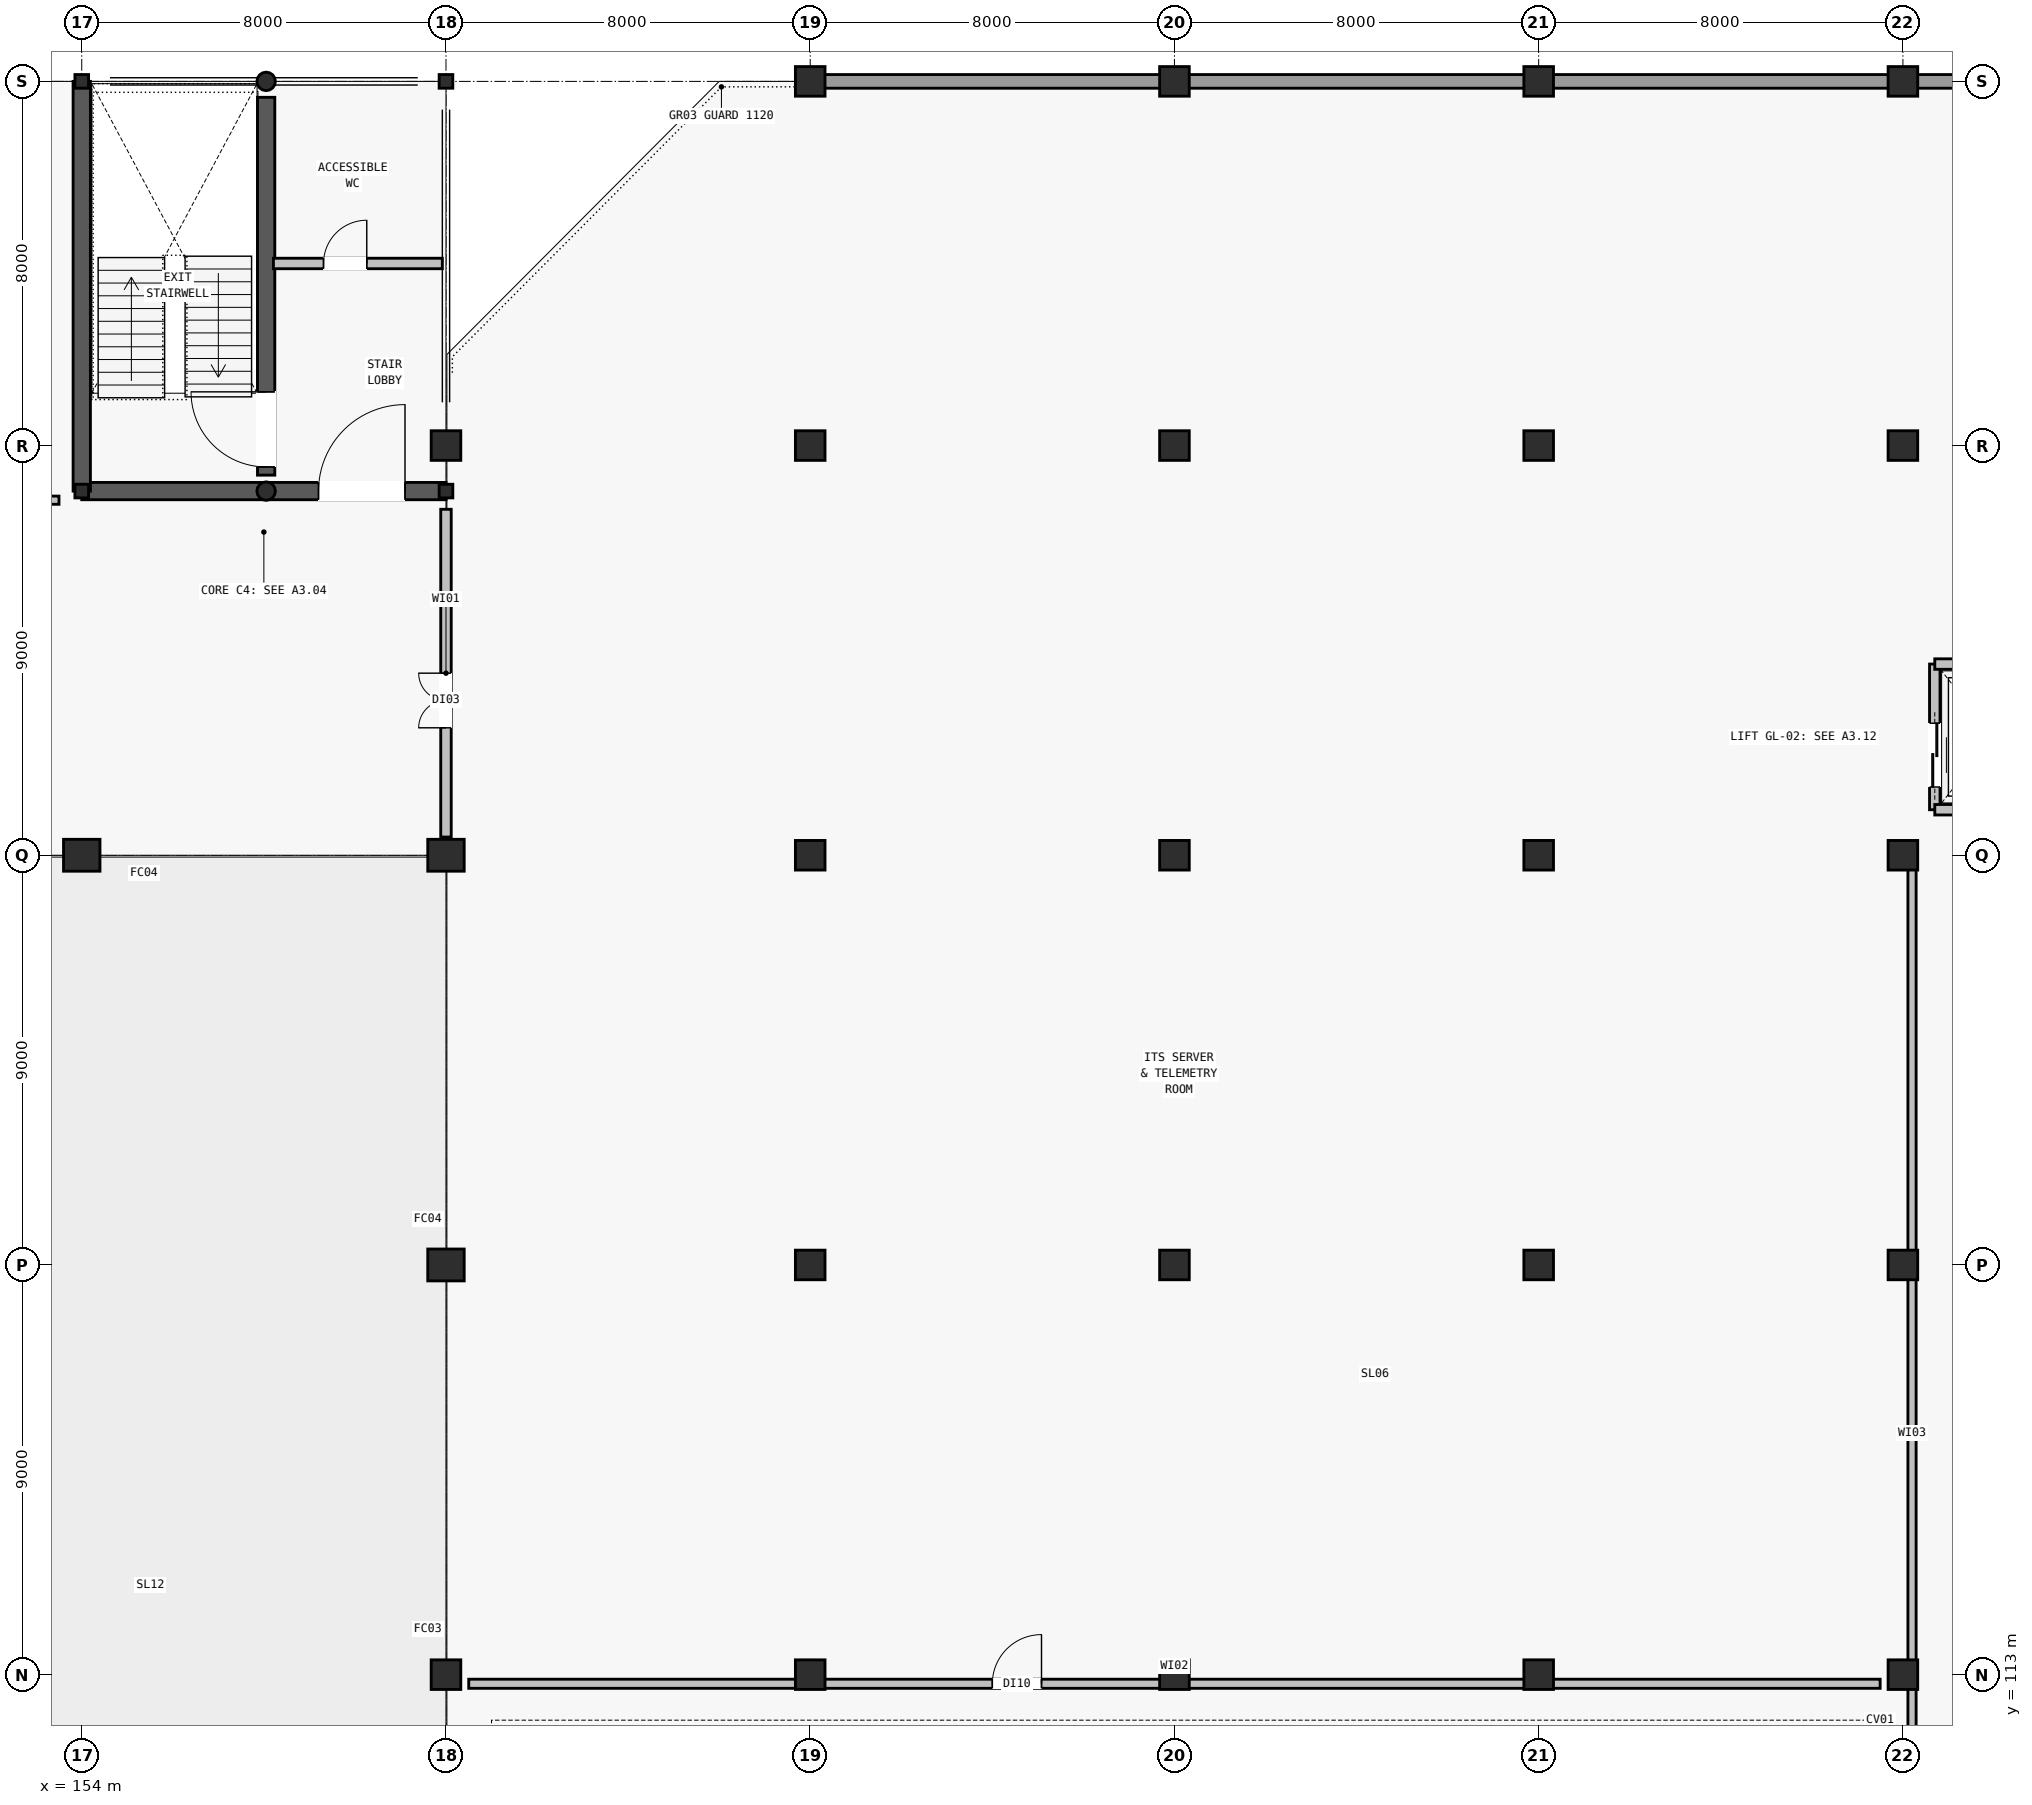
"""IFC4 building model, lengths in metres.
Left out: names, types, materials, properties, quantities, classifications, styles, units other than length and angle.
Written with IfcOpenShell. Run it as: python <this file> out.ifc"""

import sys

from ifc_helpers import new_model, si_unit, direction, frame, frame_2d, origin, origin_2d, place, context, subcontext, project, spatial, rectangle, hollow_circle, i_section, extrude, element, fill, save


model = new_model("IFC4")
c1 = context("Model", 3, precision=1e-05, world=origin(), true_north=direction((0.0, 1.0)))
c2 = subcontext(c1, "Body", "Model", "MODEL_VIEW")
j1 = project(units=[si_unit("LENGTHUNIT", "METRE"), si_unit("PLANEANGLEUNIT", "RADIAN")], contexts=[c1])
p1 = place(None, origin())
s1 = spatial("IfcSite", under=j1, at=p1, CompositionType="ELEMENT")
p2 = place(p1, origin())
s2 = spatial("IfcBuilding", under=s1, at=p2, CompositionType="ELEMENT")
p3 = place(p2, frame((0.0, 0.0, 9.5)))
s3 = spatial("IfcBuildingStorey", under=s2, at=p3, CompositionType="ELEMENT", Elevation=9.5)
for number, where, z_axis, x_axis in (
    (1, (154.0, 148.0, 0.0), (0.0, 0.0, 1.0), (1.0, 0.0, 0.0)),
    (2, (162.0, 148.0, 0.0), (0.0, 0.0, 1.0), (1.0, 0.0, 0.0)),
    (3, (154.0, 139.0, 0.0), (0.0, 0.0, 1.0), (1.0, 0.0, 0.0)),
    (4, (162.0, 139.0, 0.0), (0.0, 0.0, 1.0), (1.0, 0.0, 0.0)),
):
    element("IfcColumn", number, at=place(p3, frame(where, z_axis=z_axis, x_axis=x_axis)), inside=s3, PredefinedType="COLUMN", context=c2, shape_type="SweptSolid", body=[
        extrude(i_section(OverallWidth=0.3, OverallDepth=0.3, WebThickness=0.01, FlangeThickness=0.015, FilletRadius=0.018, at=origin_2d()), origin(), (0.0, 0.0, 1.0), 3.9),
    ])
for number, where, z_axis, x_axis in (
    (5, (158.05, 139.0, 0.0), (0.0, 0.0, 1.0), (1.0, 0.0, 0.0)),
    (6, (158.05, 148.0, 0.0), (0.0, 0.0, 1.0), (1.0, 0.0, 0.0)),
):
    element("IfcColumn", number, at=place(p3, frame(where, z_axis=z_axis, x_axis=x_axis)), inside=s3, PredefinedType="COLUMN", context=c2, shape_type="SweptSolid", body=[
        extrude(hollow_circle(Radius=0.203, WallThickness=0.014, at=origin_2d()), origin(), (0.0, 0.0, 1.0), 3.9),
    ])
for number, where, z_axis, x_axis in (
    (7, (154.0, 131.0, 0.0), (0.0, 0.0, 1.0), (1.0, 0.0, 0.0)),
    (8, (162.0, 122.0, 0.0), (0.0, 0.0, 1.0), (1.0, 0.0, 0.0)),
    (9, (162.0, 131.0, 0.0), (0.0, 0.0, 1.0), (1.0, 0.0, 0.0)),
):
    element("IfcColumn", number, at=place(p3, frame(where, z_axis=z_axis, x_axis=x_axis)), inside=s3, PredefinedType="COLUMN", context=c2, shape_type="SweptSolid", body=[
        extrude(rectangle(XDim=0.8, YDim=0.7, at=origin_2d()), origin(), (0.0, 0.0, 1.0), 3.9),
    ])
for number, where, z_axis, x_axis in (
    (10, (162.0, 113.0, 0.0), (0.0, 0.0, 1.0), (1.0, 0.0, 0.0)),
    (11, (162.0, 140.0, 0.0), (0.0, 0.0, 1.0), (1.0, 0.0, 0.0)),
    (12, (170.0, 113.0, 0.0), (0.0, 0.0, 1.0), (1.0, 0.0, 0.0)),
    (13, (170.0, 122.0, 0.0), (0.0, 0.0, 1.0), (1.0, 0.0, 0.0)),
    (14, (170.0, 131.0, 0.0), (0.0, 0.0, 1.0), (1.0, 0.0, 0.0)),
    (15, (170.0, 140.0, 0.0), (0.0, 0.0, 1.0), (1.0, 0.0, 0.0)),
    (16, (170.0, 148.0, 0.0), (0.0, 0.0, 1.0), (1.0, 0.0, 0.0)),
    (17, (178.0, 113.0, 0.0), (0.0, 0.0, 1.0), (1.0, 0.0, 0.0)),
    (18, (178.0, 122.0, 0.0), (0.0, 0.0, 1.0), (1.0, 0.0, 0.0)),
    (19, (178.0, 131.0, 0.0), (0.0, 0.0, 1.0), (1.0, 0.0, 0.0)),
    (20, (178.0, 140.0, 0.0), (0.0, 0.0, 1.0), (1.0, 0.0, 0.0)),
    (21, (178.0, 148.0, 0.0), (0.0, 0.0, 1.0), (1.0, 0.0, 0.0)),
    (22, (186.0, 113.0, 0.0), (0.0, 0.0, 1.0), (1.0, 0.0, 0.0)),
    (23, (186.0, 122.0, 0.0), (0.0, 0.0, 1.0), (1.0, 0.0, 0.0)),
    (24, (186.0, 131.0, 0.0), (0.0, 0.0, 1.0), (1.0, 0.0, 0.0)),
    (25, (186.0, 140.0, 0.0), (0.0, 0.0, 1.0), (1.0, 0.0, 0.0)),
    (26, (186.0, 148.0, 0.0), (0.0, 0.0, 1.0), (1.0, 0.0, 0.0)),
    (27, (194.0, 113.0, 0.0), (0.0, 0.0, 1.0), (1.0, 0.0, 0.0)),
    (28, (194.0, 122.0, 0.0), (0.0, 0.0, 1.0), (1.0, 0.0, 0.0)),
    (29, (194.0, 131.0, 0.0), (0.0, 0.0, 1.0), (1.0, 0.0, 0.0)),
    (30, (194.0, 140.0, 0.0), (0.0, 0.0, 1.0), (1.0, 0.0, 0.0)),
    (31, (194.0, 148.0, 0.0), (0.0, 0.0, 1.0), (1.0, 0.0, 0.0)),
):
    element("IfcColumn", number, at=place(p3, frame(where, z_axis=z_axis, x_axis=x_axis)), inside=s3, PredefinedType="COLUMN", context=c2, shape_type="SweptSolid", body=[
        extrude(rectangle(XDim=0.65, YDim=0.65, at=origin_2d()), origin(), (0.0, 0.0, 1.0), 3.9),
    ])
for number, where, z_axis, x_axis in (
    (32, (177.695, 148.0, 0.0), (0.0, 0.0, 1.0), (-1.0, 0.0, 0.0)),
    (33, (185.695, 148.0, 0.0), (0.0, 0.0, 1.0), (-1.0, 0.0, 0.0)),
    (34, (193.695, 148.0, 0.0), (0.0, 0.0, 1.0), (-1.0, 0.0, 0.0)),
):
    element("IfcWall", number, at=place(p3, frame(where, z_axis=z_axis, x_axis=x_axis)), inside=s3, PredefinedType="STANDARD", context=c2, shape_type="SweptSolid", body=[
        extrude(rectangle(XDim=7.39, YDim=0.3, at=frame_2d((3.695, 0.0))), origin(), (0.0, 0.0, 1.0), 2.48),
    ])
p4 = place(p3, frame((201.695, 148.0, 0.0), z_axis=(0.0, 0.0, 1.0), x_axis=(-1.0, 0.0, 0.0)))
e35 = element("IfcWall", 35, at=p4, inside=s3, PredefinedType="STANDARD", context=c2, shape_type="SweptSolid", body=[
    extrude(rectangle(XDim=7.39, YDim=0.3, at=frame_2d((3.695, 0.0))), origin(), (0.0, 0.0, 1.0), 2.48),
])
p5 = place(p4, frame((2.175, 0.0, 0.95)))
e36 = element("IfcOpeningElement", 36, at=p5, cuts=e35, PredefinedType="OPENING", context=c2, shape_type="SweptSolid", body=[
    extrude(rectangle(XDim=1.05, YDim=1.25, at=frame_2d((0.525, 0.625))), frame((0.0, 0.16, 0.0), z_axis=(0.0, -1.0, 0.0), x_axis=(1.0, 0.0, 0.0)), (0.0, 0.0, 1.0), 0.32),
])
p6 = place(p3, frame((154.0, 139.0, 0.0), z_axis=(0.0, 0.0, 1.0), x_axis=(1.0, 0.0, 0.0)))
e37 = element("IfcWall", 37, at=p6, inside=s3, PredefinedType="SHEAR", context=c2, shape_type="SweptSolid", body=[
    extrude(rectangle(XDim=8.0, YDim=0.38, at=frame_2d((4.0, 0.0))), origin(), (0.0, 0.0, 1.0), 3.62),
])
p7 = place(p6, frame((5.2, 0.0, 0.0)))
e38 = element("IfcOpeningElement", 38, at=p7, cuts=e37, PredefinedType="OPENING", context=c2, shape_type="SweptSolid", body=[
    extrude(rectangle(XDim=1.9, YDim=2.3, at=frame_2d((0.95, 1.15))), frame((0.0, 0.2, 0.0), z_axis=(0.0, -1.0, 0.0), x_axis=(1.0, 0.0, 0.0)), (0.0, 0.0, 1.0), 0.4),
])
p8 = place(p3, frame((154.0, 148.0, 0.0), z_axis=(0.0, 0.0, 1.0), x_axis=(0.0, -1.0, 0.0)))
e39 = element("IfcWall", 39, at=p8, inside=s3, PredefinedType="SHEAR", context=c2, shape_type="SweptSolid", body=[
    extrude(rectangle(XDim=9.0, YDim=0.38, at=frame_2d((4.5, 0.0))), origin(), (0.0, 0.0, 1.0), 3.62),
])
p9 = place(p3, frame((158.05, 139.35, 0.0), z_axis=(0.0, 0.0, 1.0), x_axis=(0.0, 1.0, 0.0)))
e40 = element("IfcWall", 40, at=p9, inside=s3, PredefinedType="SHEAR", context=c2, shape_type="SweptSolid", body=[
    extrude(rectangle(XDim=8.3, YDim=0.38, at=frame_2d((4.15, 0.0))), origin(), (0.0, 0.0, 1.0), 3.62),
])
p10 = place(p9, frame((0.18, 0.0, 0.0)))
e41 = element("IfcOpeningElement", 41, at=p10, cuts=e40, PredefinedType="OPENING", context=c2, shape_type="SweptSolid", body=[
    extrude(rectangle(XDim=1.65, YDim=2.2, at=frame_2d((0.825, 1.1))), frame((0.0, 0.2, 0.0), z_axis=(0.0, -1.0, 0.0), x_axis=(1.0, 0.0, 0.0)), (0.0, 0.0, 1.0), 0.4),
])
p11 = place(p3, frame((158.21, 144.0, 0.0), z_axis=(0.0, 0.0, 1.0), x_axis=(1.0, 0.0, 0.0)))
e42 = element("IfcWall", 42, at=p11, inside=s3, PredefinedType="PARTITIONING", context=c2, shape_type="SweptSolid", body=[
    extrude(rectangle(XDim=3.71, YDim=0.23, at=frame_2d((1.855, 0.0))), origin(), (0.0, 0.0, 1.0), 2.48),
])
p12 = place(p11, frame((1.1, 0.0, 0.0)))
e43 = element("IfcOpeningElement", 43, at=p12, cuts=e42, PredefinedType="OPENING", context=c2, shape_type="SweptSolid", body=[
    extrude(rectangle(XDim=0.95, YDim=2.1, at=frame_2d((0.475, 1.05))), frame((0.0, 0.125, 0.0), z_axis=(0.0, -1.0, 0.0), x_axis=(1.0, 0.0, 0.0)), (0.0, 0.0, 1.0), 0.25),
])
p13 = place(p3, frame((194.7, 132.0, 0.0), z_axis=(0.0, 0.0, 1.0), x_axis=(0.0, 1.0, 0.0)))
e44 = element("IfcWall", 44, at=p13, inside=s3, PredefinedType="PARTITIONING", context=c2, shape_type="SweptSolid", body=[
    extrude(rectangle(XDim=3.2, YDim=0.23, at=frame_2d((1.6, 0.0))), origin(), (0.0, 0.0, 1.0), 2.48),
])
p14 = place(p13, frame((0.5, 0.0, 0.0)))
e45 = element("IfcOpeningElement", 45, at=p14, cuts=e44, PredefinedType="OPENING", context=c2, shape_type="SweptSolid", body=[
    extrude(rectangle(XDim=1.4, YDim=2.3, at=frame_2d((0.7, 1.15))), frame((0.0, 0.125, 0.0), z_axis=(0.0, -1.0, 0.0), x_axis=(1.0, 0.0, 0.0)), (0.0, 0.0, 1.0), 0.25),
])
for number, where, z_axis, x_axis in (
    (46, (194.7, 135.2, 0.0), (0.0, 0.0, 1.0), (1.0, 0.0, 0.0)),
    (47, (197.3, 132.0, 0.0), (0.0, 0.0, 1.0), (-1.0, 0.0, 0.0)),
):
    element("IfcWall", number, at=place(p3, frame(where, z_axis=z_axis, x_axis=x_axis)), inside=s3, PredefinedType="PARTITIONING", context=c2, shape_type="SweptSolid", body=[
        extrude(rectangle(XDim=2.6, YDim=0.23, at=frame_2d((1.3, 0.0))), origin(), (0.0, 0.0, 1.0), 2.48),
    ])
p15 = place(p3, frame((162.0, 131.4, 0.0), z_axis=(0.0, 0.0, 1.0), x_axis=(0.0, 1.0, 0.0)))
e48 = element("IfcWall", 48, at=p15, inside=s3, PredefinedType="PARTITIONING", context=c2, shape_type="SweptSolid", body=[
    extrude(rectangle(XDim=7.2, YDim=0.23, at=frame_2d((3.6, 0.0))), origin(), (0.0, 0.0, 1.0), 2.48),
])
p16 = place(p15, frame((2.4, 0.0, 0.0)))
e49 = element("IfcOpeningElement", 49, at=p16, cuts=e48, PredefinedType="OPENING", context=c2, shape_type="SweptSolid", body=[
    extrude(rectangle(XDim=1.2, YDim=2.2, at=frame_2d((0.6, 1.1))), frame((0.0, 0.125, 0.0), z_axis=(0.0, -1.0, 0.0), x_axis=(1.0, 0.0, 0.0)), (0.0, 0.0, 1.0), 0.25),
])
p17 = place(p3, frame((96.5, 138.8, 0.0), z_axis=(0.0, 0.0, 1.0), x_axis=(1.0, 0.0, 0.0)))
e50 = element("IfcWall", 50, at=p17, inside=s3, PredefinedType="PARTITIONING", context=c2, shape_type="SweptSolid", body=[
    extrude(rectangle(XDim=57.0, YDim=0.18, at=frame_2d((28.5, 0.0))), origin(), (0.0, 0.0, 1.0), 2.48),
])
p18 = place(p17, frame((16.5, 0.0, 0.0)))
e51 = element("IfcOpeningElement", 51, at=p18, cuts=e50, PredefinedType="OPENING", context=c2, shape_type="SweptSolid", body=[
    extrude(rectangle(XDim=1.75, YDim=2.25, at=frame_2d((0.875, 1.125))), frame((0.0, 0.1, 0.0), z_axis=(0.0, -1.0, 0.0), x_axis=(1.0, 0.0, 0.0)), (0.0, 0.0, 1.0), 0.2),
])
p19 = place(p3, frame((162.5, 112.8, 0.0), z_axis=(0.0, 0.0, 1.0), x_axis=(1.0, 0.0, 0.0)))
e52 = element("IfcWall", 52, at=p19, inside=s3, PredefinedType="PARTITIONING", context=c2, shape_type="SweptSolid", body=[
    extrude(rectangle(XDim=31.0, YDim=0.2, at=frame_2d((15.5, 0.0))), origin(), (0.0, 0.0, 1.0), 2.48),
])
p20 = place(p19, frame((11.5, 0.0, 0.0)))
e53 = element("IfcOpeningElement", 53, at=p20, cuts=e52, PredefinedType="OPENING", context=c2, shape_type="SweptSolid", body=[
    extrude(rectangle(XDim=1.08, YDim=2.15, at=frame_2d((0.54, 1.075))), frame((0.0, 0.11, 0.0), z_axis=(0.0, -1.0, 0.0), x_axis=(1.0, 0.0, 0.0)), (0.0, 0.0, 1.0), 0.22),
])
p21 = place(p3, frame((194.2, 86.2, 0.0), z_axis=(0.0, 0.0, 1.0), x_axis=(0.0, 1.0, 0.0)))
e54 = element("IfcWall", 54, at=p21, inside=s3, PredefinedType="PARTITIONING", context=c2, shape_type="SweptSolid", body=[
    extrude(rectangle(XDim=45.0, YDim=0.18, at=frame_2d((22.5, 0.0))), origin(), (0.0, 0.0, 1.0), 2.48),
])
p22 = place(p21, frame((13.5, 0.0, 0.0)))
e55 = element("IfcOpeningElement", 55, at=p22, cuts=e54, PredefinedType="OPENING", context=c2, shape_type="SweptSolid", body=[
    extrude(rectangle(XDim=1.15, YDim=2.15, at=frame_2d((0.575, 1.075))), frame((0.0, 0.1, 0.0), z_axis=(0.0, -1.0, 0.0), x_axis=(1.0, 0.0, 0.0)), (0.0, 0.0, 1.0), 0.2),
])
p23 = place(p7, origin())
e56 = element("IfcDoor", 56, at=p23, inside=s3, OperationType="SINGLE_SWING_RIGHT", PredefinedType="DOOR", context=c2, shape_type="SweptSolid", body=[
    extrude(rectangle(XDim=1.9, YDim=2.3, at=frame_2d((0.95, 1.15))), frame((0.0, 0.025, 0.0), z_axis=(0.0, -1.0, 0.0), x_axis=(1.0, 0.0, 0.0)), (0.0, 0.0, 1.0), 0.05),
])
fill(e38, e56)
p24 = place(p10, origin())
e57 = element("IfcDoor", 57, at=p24, inside=s3, OperationType="SINGLE_SWING_RIGHT", PredefinedType="DOOR", context=c2, shape_type="SweptSolid", body=[
    extrude(rectangle(XDim=1.65, YDim=2.2, at=frame_2d((0.825, 1.1))), frame((0.0, 0.025, 0.0), z_axis=(0.0, -1.0, 0.0), x_axis=(1.0, 0.0, 0.0)), (0.0, 0.0, 1.0), 0.05),
])
fill(e41, e57)
p25 = place(p12, origin())
e58 = element("IfcDoor", 58, at=p25, inside=s3, OperationType="SINGLE_SWING_RIGHT", PredefinedType="DOOR", context=c2, shape_type="SweptSolid", body=[
    extrude(rectangle(XDim=0.95, YDim=2.1, at=frame_2d((0.475, 1.05))), frame((0.0, 0.025, 0.0), z_axis=(0.0, -1.0, 0.0), x_axis=(1.0, 0.0, 0.0)), (0.0, 0.0, 1.0), 0.05),
])
fill(e43, e58)
p26 = place(p14, origin())
e59 = element("IfcDoor", 59, at=p26, inside=s3, OperationType="SLIDING_TO_RIGHT", PredefinedType="DOOR", context=c2, shape_type="SweptSolid", body=[
    extrude(rectangle(XDim=1.4, YDim=2.3, at=frame_2d((0.7, 1.15))), frame((0.0, 0.025, 0.0), z_axis=(0.0, -1.0, 0.0), x_axis=(1.0, 0.0, 0.0)), (0.0, 0.0, 1.0), 0.05),
])
fill(e45, e59)
p27 = place(p16, origin())
e60 = element("IfcDoor", 60, at=p27, inside=s3, OperationType="DOUBLE_SWING_LEFT", PredefinedType="DOOR", context=c2, shape_type="SweptSolid", body=[
    extrude(rectangle(XDim=1.2, YDim=2.2, at=frame_2d((0.6, 1.1))), frame((0.0, 0.025, 0.0), z_axis=(0.0, -1.0, 0.0), x_axis=(1.0, 0.0, 0.0)), (0.0, 0.0, 1.0), 0.05),
])
fill(e49, e60)
p28 = place(p20, origin())
e61 = element("IfcDoor", 61, at=p28, inside=s3, OperationType="SINGLE_SWING_RIGHT", PredefinedType="DOOR", context=c2, shape_type="SweptSolid", body=[
    extrude(rectangle(XDim=1.08, YDim=2.15, at=frame_2d((0.54, 1.075))), frame((0.0, 0.025, 0.0), z_axis=(0.0, -1.0, 0.0), x_axis=(1.0, 0.0, 0.0)), (0.0, 0.0, 1.0), 0.05),
])
fill(e53, e61)
save(model, sys.argv[1])
